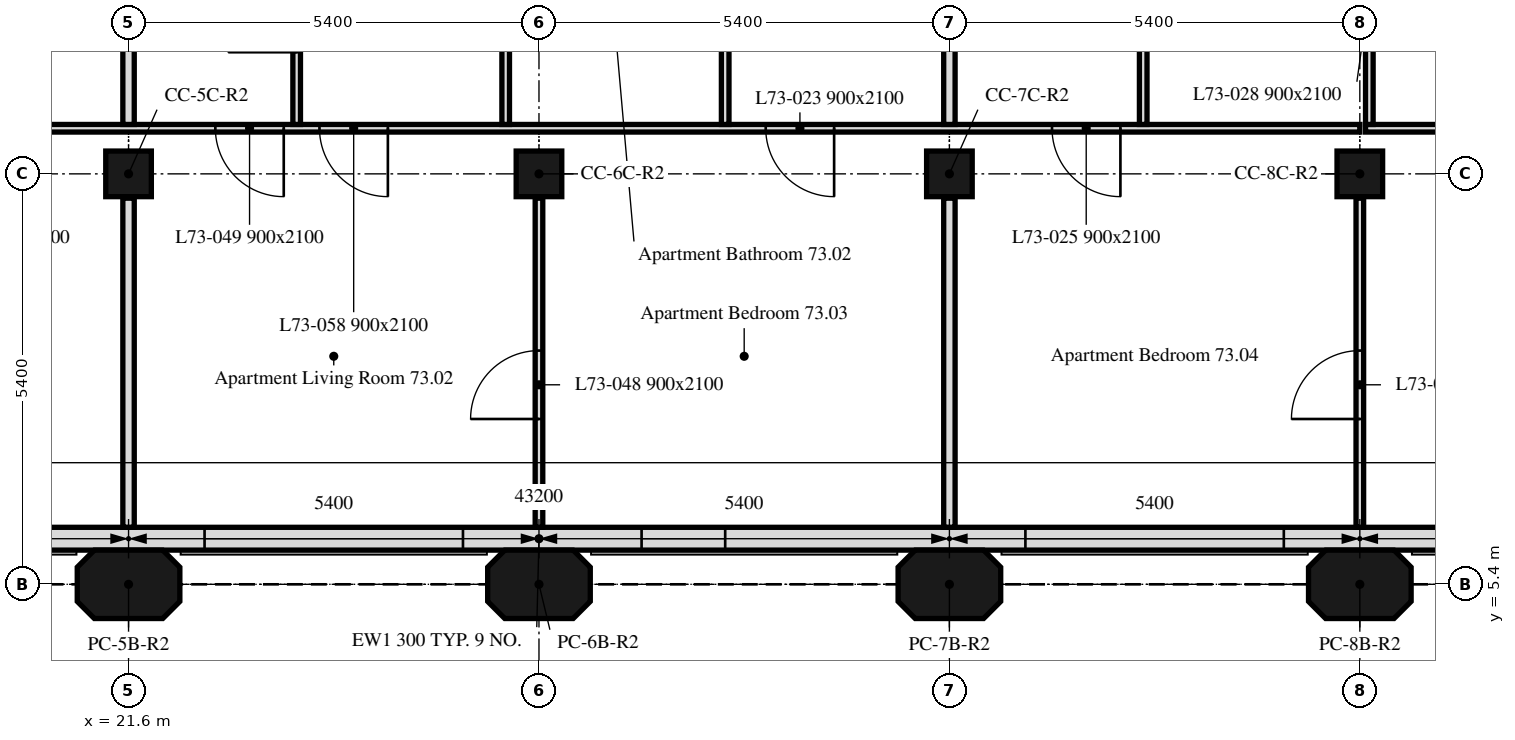
"""IFC4 building model, lengths in metres.
Left out: names, types, materials, properties, quantities, classifications, styles, units other than length and angle.
Written with IfcOpenShell. Run it as: python <this file> out.ifc"""

import sys

from ifc_helpers import new_model, si_unit, direction, frame, frame_2d, origin, origin_2d, place, context, subcontext, project, spatial, polyline, rectangle, outline, extrude, element, fill, save


model = new_model("IFC4")
c1 = context("Model", 3, precision=1e-05, world=origin(), true_north=direction((0.0, 1.0)))
c2 = subcontext(c1, "Body", "Model", "MODEL_VIEW")
j1 = project(units=[si_unit("LENGTHUNIT", "METRE"), si_unit("PLANEANGLEUNIT", "RADIAN")], contexts=[c1])
p1 = place(None, origin())
s1 = spatial("IfcSite", under=j1, at=p1, CompositionType="ELEMENT")
p2 = place(p1, origin())
s2 = spatial("IfcBuilding", under=s1, at=p2, CompositionType="ELEMENT")
p3 = place(p2, frame((0.0, 0.0, 295.0)))
s3 = spatial("IfcBuildingStorey", under=s2, at=p3, CompositionType="ELEMENT", Elevation=295.0)
for number, where, z_axis, x_axis in (
    (1, (21.6, 5.4, 0.0), (0.0, 0.0, 1.0), (1.0, 0.0, 0.0)),
    (2, (27.0, 5.4, 0.0), (0.0, 0.0, 1.0), (1.0, 0.0, 0.0)),
    (3, (32.4, 5.4, 0.0), (0.0, 0.0, 1.0), (1.0, 0.0, 0.0)),
    (4, (37.8, 5.4, 0.0), (0.0, 0.0, 1.0), (1.0, 0.0, 0.0)),
):
    element("IfcColumn", number, at=place(p3, frame(where, z_axis=z_axis, x_axis=x_axis)), inside=s3, PredefinedType="COLUMN", context=c2, shape_type="SweptSolid", body=[
        extrude(outline(polyline([(-0.45, -0.45), (0.45, -0.45), (0.675, -0.225), (0.675, 0.225), (0.45, 0.45), (-0.45, 0.45), (-0.675, 0.225), (-0.675, -0.225), (-0.45, -0.45)])), origin(), (0.0, 0.0, 1.0), 3.0),
    ])
for number, where, z_axis, x_axis in (
    (5, (21.6, 10.8, 0.0), (0.0, 0.0, 1.0), (1.0, 0.0, 0.0)),
    (6, (27.0, 10.8, 0.0), (0.0, 0.0, 1.0), (1.0, 0.0, 0.0)),
    (7, (32.4, 10.8, 0.0), (0.0, 0.0, 1.0), (1.0, 0.0, 0.0)),
    (8, (37.8, 10.8, 0.0), (0.0, 0.0, 1.0), (1.0, 0.0, 0.0)),
):
    element("IfcColumn", number, at=place(p3, frame(where, z_axis=z_axis, x_axis=x_axis)), inside=s3, PredefinedType="COLUMN", context=c2, shape_type="SweptSolid", body=[
        extrude(rectangle(XDim=0.6, YDim=0.6, at=origin_2d()), origin(), (0.0, 0.0, 1.0), 3.0),
    ])
p4 = place(p3, frame((10.986, 6.0, 0.0), z_axis=(0.0, 0.0, 1.0), x_axis=(1.0, 0.0, 0.0)))
e9 = element("IfcWall", 9, at=p4, inside=s3, PredefinedType="SOLIDWALL", context=c2, shape_type="SweptSolid", body=[
    extrude(rectangle(XDim=32.027, YDim=0.3, at=frame_2d((16.014, 0.0))), origin(), (0.0, 0.0, 1.0), 3.0),
])
p5 = place(p4, frame((0.814, 0.0, 0.9)))
e10 = element("IfcOpeningElement", 10, at=p5, cuts=e9, PredefinedType="OPENING", context=c2, shape_type="SweptSolid", body=[
    extrude(rectangle(XDim=3.4, YDim=1.7, at=frame_2d((1.7, 0.85))), frame((0.0, 0.16, 0.0), z_axis=(0.0, -1.0, 0.0), x_axis=(1.0, 0.0, 0.0)), (0.0, 0.0, 1.0), 0.32),
])
p6 = place(p4, frame((6.564, 0.0, 0.9)))
e11 = element("IfcOpeningElement", 11, at=p6, cuts=e9, PredefinedType="OPENING", context=c2, shape_type="SweptSolid", body=[
    extrude(rectangle(XDim=1.1, YDim=1.7, at=frame_2d((0.55, 0.85))), frame((0.0, 0.16, 0.0), z_axis=(0.0, -1.0, 0.0), x_axis=(1.0, 0.0, 0.0)), (0.0, 0.0, 1.0), 0.32),
])
p7 = place(p4, frame((11.614, 0.0, 0.9)))
e12 = element("IfcOpeningElement", 12, at=p7, cuts=e9, PredefinedType="OPENING", context=c2, shape_type="SweptSolid", body=[
    extrude(rectangle(XDim=3.4, YDim=1.7, at=frame_2d((1.7, 0.85))), frame((0.0, 0.16, 0.0), z_axis=(0.0, -1.0, 0.0), x_axis=(1.0, 0.0, 0.0)), (0.0, 0.0, 1.0), 0.32),
])
p8 = place(p4, frame((17.364, 0.0, 0.9)))
e13 = element("IfcOpeningElement", 13, at=p8, cuts=e9, PredefinedType="OPENING", context=c2, shape_type="SweptSolid", body=[
    extrude(rectangle(XDim=1.1, YDim=1.7, at=frame_2d((0.55, 0.85))), frame((0.0, 0.16, 0.0), z_axis=(0.0, -1.0, 0.0), x_axis=(1.0, 0.0, 0.0)), (0.0, 0.0, 1.0), 0.32),
])
p9 = place(p4, frame((22.414, 0.0, 0.9)))
e14 = element("IfcOpeningElement", 14, at=p9, cuts=e9, PredefinedType="OPENING", context=c2, shape_type="SweptSolid", body=[
    extrude(rectangle(XDim=3.4, YDim=1.7, at=frame_2d((1.7, 0.85))), frame((0.0, 0.16, 0.0), z_axis=(0.0, -1.0, 0.0), x_axis=(1.0, 0.0, 0.0)), (0.0, 0.0, 1.0), 0.32),
])
p10 = place(p4, frame((28.164, 0.0, 0.9)))
e15 = element("IfcOpeningElement", 15, at=p10, cuts=e9, PredefinedType="OPENING", context=c2, shape_type="SweptSolid", body=[
    extrude(rectangle(XDim=1.1, YDim=1.7, at=frame_2d((0.55, 0.85))), frame((0.0, 0.16, 0.0), z_axis=(0.0, -1.0, 0.0), x_axis=(1.0, 0.0, 0.0)), (0.0, 0.0, 1.0), 0.32),
])
p11 = place(p3, frame((21.6, 6.151, 0.0), z_axis=(0.0, 0.0, 1.0), x_axis=(0.0, 1.0, 0.0)))
e16 = element("IfcWall", 16, at=p11, inside=s3, PredefinedType="PARTITIONING", context=c2, shape_type="SweptSolid", body=[
    extrude(rectangle(XDim=4.329, YDim=0.15, at=frame_2d((2.165, 0.0))), origin(), (0.0, 0.0, 1.0), 3.0),
])
p12 = place(p3, frame((37.8, 11.4, 0.0), z_axis=(0.0, 0.0, 1.0), x_axis=(-1.0, 0.0, 0.0)))
e17 = element("IfcWall", 17, at=p12, inside=s3, PredefinedType="PARTITIONING", context=c2, shape_type="SweptSolid", body=[
    extrude(rectangle(XDim=21.6, YDim=0.1, at=frame_2d((10.8, 0.0))), origin(), (0.0, 0.0, 1.0), 3.0),
])
p13 = place(p12, frame((18.87, 0.0, 0.0)))
e18 = element("IfcOpeningElement", 18, at=p13, cuts=e17, PredefinedType="OPENING", context=c2, shape_type="SweptSolid", body=[
    extrude(rectangle(XDim=0.9, YDim=2.1, at=frame_2d((0.45, 1.05))), frame((0.0, 0.05, 0.0), z_axis=(0.0, -1.0, 0.0), x_axis=(1.0, 0.0, 0.0)), (0.0, 0.0, 1.0), 0.1),
])
p14 = place(p12, frame((17.5, 0.0, 0.0)))
e19 = element("IfcOpeningElement", 19, at=p14, cuts=e17, PredefinedType="OPENING", context=c2, shape_type="SweptSolid", body=[
    extrude(rectangle(XDim=0.9, YDim=2.1, at=frame_2d((0.45, 1.05))), frame((0.0, 0.05, 0.0), z_axis=(0.0, -1.0, 0.0), x_axis=(1.0, 0.0, 0.0)), (0.0, 0.0, 1.0), 0.1),
])
p15 = place(p12, frame((6.917, 0.0, 0.0)))
e20 = element("IfcOpeningElement", 20, at=p15, cuts=e17, PredefinedType="OPENING", context=c2, shape_type="SweptSolid", body=[
    extrude(rectangle(XDim=0.9, YDim=2.1, at=frame_2d((0.45, 1.05))), frame((0.0, 0.05, 0.0), z_axis=(0.0, -1.0, 0.0), x_axis=(1.0, 0.0, 0.0)), (0.0, 0.0, 1.0), 0.1),
])
p16 = place(p12, frame((3.15, 0.0, 0.0)))
e21 = element("IfcOpeningElement", 21, at=p16, cuts=e17, PredefinedType="OPENING", context=c2, shape_type="SweptSolid", body=[
    extrude(rectangle(XDim=0.9, YDim=2.1, at=frame_2d((0.45, 1.05))), frame((0.0, 0.05, 0.0), z_axis=(0.0, -1.0, 0.0), x_axis=(1.0, 0.0, 0.0)), (0.0, 0.0, 1.0), 0.1),
])
p17 = place(p12, frame((14.158, 0.0, 0.0)))
e22 = element("IfcOpeningElement", 22, at=p17, cuts=e17, PredefinedType="OPENING", context=c2, shape_type="SweptSolid", body=[
    extrude(rectangle(XDim=0.9, YDim=2.1, at=frame_2d((0.45, 1.05))), frame((0.0, 0.05, 0.0), z_axis=(0.0, -1.0, 0.0), x_axis=(1.0, 0.0, 0.0)), (0.0, 0.0, 1.0), 0.1),
])
p18 = place(p12, frame((12.788, 0.0, 0.0)))
e23 = element("IfcOpeningElement", 23, at=p18, cuts=e17, PredefinedType="OPENING", context=c2, shape_type="SweptSolid", body=[
    extrude(rectangle(XDim=0.9, YDim=2.1, at=frame_2d((0.45, 1.05))), frame((0.0, 0.05, 0.0), z_axis=(0.0, -1.0, 0.0), x_axis=(1.0, 0.0, 0.0)), (0.0, 0.0, 1.0), 0.1),
])
p19 = place(p3, frame((21.6, 11.45, 0.0), z_axis=(0.0, 0.0, 1.0), x_axis=(0.0, 1.0, 0.0)))
e24 = element("IfcWall", 24, at=p19, inside=s3, PredefinedType="PARTITIONING", context=c2, shape_type="SweptSolid", body=[
    extrude(rectangle(XDim=2.425, YDim=0.15, at=frame_2d((1.212, 0.0))), origin(), (0.0, 0.0, 1.0), 3.0),
])
p20 = place(p3, frame((27.0, 6.151, 0.0), z_axis=(0.0, 0.0, 1.0), x_axis=(0.0, 1.0, 0.0)))
e25 = element("IfcWall", 25, at=p20, inside=s3, PredefinedType="PARTITIONING", context=c2, shape_type="SweptSolid", body=[
    extrude(rectangle(XDim=4.329, YDim=0.1, at=frame_2d((2.165, 0.0))), origin(), (0.0, 0.0, 1.0), 3.0),
])
p21 = place(p20, frame((1.424, 0.0, 0.0)))
e26 = element("IfcOpeningElement", 26, at=p21, cuts=e25, PredefinedType="OPENING", context=c2, shape_type="SweptSolid", body=[
    extrude(rectangle(XDim=0.9, YDim=2.1, at=frame_2d((0.45, 1.05))), frame((0.0, 0.05, 0.0), z_axis=(0.0, -1.0, 0.0), x_axis=(1.0, 0.0, 0.0)), (0.0, 0.0, 1.0), 0.1),
])
p22 = place(p3, frame((32.4, 6.151, 0.0), z_axis=(0.0, 0.0, 1.0), x_axis=(0.0, 1.0, 0.0)))
e27 = element("IfcWall", 27, at=p22, inside=s3, PredefinedType="PARTITIONING", context=c2, shape_type="SweptSolid", body=[
    extrude(rectangle(XDim=4.329, YDim=0.15, at=frame_2d((2.165, 0.0))), origin(), (0.0, 0.0, 1.0), 3.0),
])
p23 = place(p3, frame((23.812, 11.45, 0.0), z_axis=(0.0, 0.0, 1.0), x_axis=(0.0, 1.0, 0.0)))
e28 = element("IfcWall", 28, at=p23, inside=s3, PredefinedType="PARTITIONING", context=c2, shape_type="SweptSolid", body=[
    extrude(rectangle(XDim=2.425, YDim=0.1, at=frame_2d((1.212, 0.0))), origin(), (0.0, 0.0, 1.0), 3.0),
])
p24 = place(p23, frame((0.95, 0.0, 0.0)))
e29 = element("IfcOpeningElement", 29, at=p24, cuts=e28, PredefinedType="OPENING", context=c2, shape_type="SweptSolid", body=[
    extrude(rectangle(XDim=0.9, YDim=2.1, at=frame_2d((0.45, 1.05))), frame((0.0, 0.05, 0.0), z_axis=(0.0, -1.0, 0.0), x_axis=(1.0, 0.0, 0.0)), (0.0, 0.0, 1.0), 0.1),
])
p25 = place(p3, frame((26.562, 11.45, 0.0), z_axis=(0.0, 0.0, 1.0), x_axis=(0.0, 1.0, 0.0)))
e30 = element("IfcWall", 30, at=p25, inside=s3, PredefinedType="PARTITIONING", context=c2, shape_type="SweptSolid", body=[
    extrude(rectangle(XDim=2.425, YDim=0.1, at=frame_2d((1.212, 0.0))), origin(), (0.0, 0.0, 1.0), 3.0),
])
p26 = place(p25, frame((1.275, 0.0, 0.0)))
e31 = element("IfcOpeningElement", 31, at=p26, cuts=e30, PredefinedType="OPENING", context=c2, shape_type="SweptSolid", body=[
    extrude(rectangle(XDim=0.9, YDim=2.1, at=frame_2d((0.45, 1.05))), frame((0.0, 0.05, 0.0), z_axis=(0.0, -1.0, 0.0), x_axis=(1.0, 0.0, 0.0)), (0.0, 0.0, 1.0), 0.1),
])
p27 = place(p3, frame((29.45, 11.45, 0.0), z_axis=(0.0, 0.0, 1.0), x_axis=(0.0, 1.0, 0.0)))
e32 = element("IfcWall", 32, at=p27, inside=s3, PredefinedType="PARTITIONING", context=c2, shape_type="SweptSolid", body=[
    extrude(rectangle(XDim=2.425, YDim=0.1, at=frame_2d((1.212, 0.0))), origin(), (0.0, 0.0, 1.0), 3.0),
])
p28 = place(p3, frame((32.4, 11.45, 0.0), z_axis=(0.0, 0.0, 1.0), x_axis=(0.0, 1.0, 0.0)))
e33 = element("IfcWall", 33, at=p28, inside=s3, PredefinedType="PARTITIONING", context=c2, shape_type="SweptSolid", body=[
    extrude(rectangle(XDim=2.425, YDim=0.15, at=frame_2d((1.212, 0.0))), origin(), (0.0, 0.0, 1.0), 3.0),
])
p29 = place(p3, frame((37.8, 6.151, 0.0), z_axis=(0.0, 0.0, 1.0), x_axis=(0.0, 1.0, 0.0)))
e34 = element("IfcWall", 34, at=p29, inside=s3, PredefinedType="PARTITIONING", context=c2, shape_type="SweptSolid", body=[
    extrude(rectangle(XDim=4.329, YDim=0.1, at=frame_2d((2.165, 0.0))), origin(), (0.0, 0.0, 1.0), 3.0),
])
p30 = place(p29, frame((1.424, 0.0, 0.0)))
e35 = element("IfcOpeningElement", 35, at=p30, cuts=e34, PredefinedType="OPENING", context=c2, shape_type="SweptSolid", body=[
    extrude(rectangle(XDim=0.9, YDim=2.1, at=frame_2d((0.45, 1.05))), frame((0.0, 0.05, 0.0), z_axis=(0.0, -1.0, 0.0), x_axis=(1.0, 0.0, 0.0)), (0.0, 0.0, 1.0), 0.1),
])
p31 = place(p3, frame((47.849, 11.4, 0.0), z_axis=(0.0, 0.0, 1.0), x_axis=(-1.0, 0.0, 0.0)))
e36 = element("IfcWall", 36, at=p31, inside=s3, PredefinedType="PARTITIONING", context=c2, shape_type="SweptSolid", body=[
    extrude(rectangle(XDim=9.974, YDim=0.1, at=frame_2d((4.987, 0.0))), origin(), (0.0, 0.0, 1.0), 3.0),
])
p32 = place(p31, frame((1.909, 0.0, 0.0)))
e37 = element("IfcOpeningElement", 37, at=p32, cuts=e36, PredefinedType="OPENING", context=c2, shape_type="SweptSolid", body=[
    extrude(rectangle(XDim=0.9, YDim=2.1, at=frame_2d((0.45, 1.05))), frame((0.0, 0.05, 0.0), z_axis=(0.0, -1.0, 0.0), x_axis=(1.0, 0.0, 0.0)), (0.0, 0.0, 1.0), 0.1),
])
p33 = place(p31, frame((0.25, 0.0, 0.0)))
e38 = element("IfcOpeningElement", 38, at=p33, cuts=e36, PredefinedType="OPENING", context=c2, shape_type="SweptSolid", body=[
    extrude(rectangle(XDim=0.9, YDim=2.1, at=frame_2d((0.45, 1.05))), frame((0.0, 0.05, 0.0), z_axis=(0.0, -1.0, 0.0), x_axis=(1.0, 0.0, 0.0)), (0.0, 0.0, 1.0), 0.1),
])
p34 = place(p31, frame((7.474, 0.0, 0.0)))
e39 = element("IfcOpeningElement", 39, at=p34, cuts=e36, PredefinedType="OPENING", context=c2, shape_type="SweptSolid", body=[
    extrude(rectangle(XDim=0.9, YDim=2.1, at=frame_2d((0.45, 1.05))), frame((0.0, 0.05, 0.0), z_axis=(0.0, -1.0, 0.0), x_axis=(1.0, 0.0, 0.0)), (0.0, 0.0, 1.0), 0.1),
])
p35 = place(p3, frame((34.95, 11.45, 0.0), z_axis=(0.0, 0.0, 1.0), x_axis=(0.0, 1.0, 0.0)))
e40 = element("IfcWall", 40, at=p35, inside=s3, PredefinedType="PARTITIONING", context=c2, shape_type="SweptSolid", body=[
    extrude(rectangle(XDim=2.425, YDim=0.1, at=frame_2d((1.212, 0.0))), origin(), (0.0, 0.0, 1.0), 3.0),
])
p36 = place(p3, frame((37.925, 11.45, 0.0), z_axis=(0.0, 0.0, 1.0), x_axis=(0.0, 1.0, 0.0)))
e41 = element("IfcWall", 41, at=p36, inside=s3, PredefinedType="PARTITIONING", context=c2, shape_type="SweptSolid", body=[
    extrude(rectangle(XDim=2.425, YDim=0.1, at=frame_2d((1.212, 0.0))), origin(), (0.0, 0.0, 1.0), 3.0),
])
p37 = place(p36, frame((1.275, 0.0, 0.0)))
e42 = element("IfcOpeningElement", 42, at=p37, cuts=e41, PredefinedType="OPENING", context=c2, shape_type="SweptSolid", body=[
    extrude(rectangle(XDim=0.9, YDim=2.1, at=frame_2d((0.45, 1.05))), frame((0.0, 0.05, 0.0), z_axis=(0.0, -1.0, 0.0), x_axis=(1.0, 0.0, 0.0)), (0.0, 0.0, 1.0), 0.1),
])
p38 = place(p7, origin())
e43 = element("IfcWindow", 43, at=p38, inside=s3, PartitioningType="SINGLE_PANEL", PredefinedType="WINDOW", context=c2, shape_type="SweptSolid", body=[
    extrude(rectangle(XDim=3.4, YDim=1.7, at=frame_2d((1.7, 0.85))), frame((0.0, 0.03, 0.0), z_axis=(0.0, -1.0, 0.0), x_axis=(1.0, 0.0, 0.0)), (0.0, 0.0, 1.0), 0.06),
])
fill(e12, e43)
p39 = place(p8, origin())
e44 = element("IfcWindow", 44, at=p39, inside=s3, PartitioningType="SINGLE_PANEL", PredefinedType="WINDOW", context=c2, shape_type="SweptSolid", body=[
    extrude(rectangle(XDim=1.1, YDim=1.7, at=frame_2d((0.55, 0.85))), frame((0.0, 0.03, 0.0), z_axis=(0.0, -1.0, 0.0), x_axis=(1.0, 0.0, 0.0)), (0.0, 0.0, 1.0), 0.06),
])
fill(e13, e44)
p40 = place(p9, origin())
e45 = element("IfcWindow", 45, at=p40, inside=s3, PartitioningType="SINGLE_PANEL", PredefinedType="WINDOW", context=c2, shape_type="SweptSolid", body=[
    extrude(rectangle(XDim=3.4, YDim=1.7, at=frame_2d((1.7, 0.85))), frame((0.0, 0.03, 0.0), z_axis=(0.0, -1.0, 0.0), x_axis=(1.0, 0.0, 0.0)), (0.0, 0.0, 1.0), 0.06),
])
fill(e14, e45)
p41 = place(p15, origin())
e46 = element("IfcDoor", 46, at=p41, inside=s3, OperationType="SINGLE_SWING_LEFT", PredefinedType="DOOR", context=c2, shape_type="SweptSolid", body=[
    extrude(rectangle(XDim=0.9, YDim=2.1, at=frame_2d((0.45, 1.05))), frame((0.0, 0.025, 0.0), z_axis=(0.0, -1.0, 0.0), x_axis=(1.0, 0.0, 0.0)), (0.0, 0.0, 1.0), 0.05),
])
fill(e20, e46)
p42 = place(p16, origin())
e47 = element("IfcDoor", 47, at=p42, inside=s3, OperationType="SINGLE_SWING_RIGHT", PredefinedType="DOOR", context=c2, shape_type="SweptSolid", body=[
    extrude(rectangle(XDim=0.9, YDim=2.1, at=frame_2d((0.45, 1.05))), frame((0.0, 0.025, 0.0), z_axis=(0.0, -1.0, 0.0), x_axis=(1.0, 0.0, 0.0)), (0.0, 0.0, 1.0), 0.05),
])
fill(e21, e47)
p43 = place(p21, origin())
e48 = element("IfcDoor", 48, at=p43, inside=s3, OperationType="SINGLE_SWING_RIGHT", PredefinedType="DOOR", context=c2, shape_type="SweptSolid", body=[
    extrude(rectangle(XDim=0.9, YDim=2.1, at=frame_2d((0.45, 1.05))), frame((0.0, 0.025, 0.0), z_axis=(0.0, -1.0, 0.0), x_axis=(1.0, 0.0, 0.0)), (0.0, 0.0, 1.0), 0.05),
])
fill(e26, e48)
p44 = place(p17, origin())
e49 = element("IfcDoor", 49, at=p44, inside=s3, OperationType="SINGLE_SWING_RIGHT", PredefinedType="DOOR", context=c2, shape_type="SweptSolid", body=[
    extrude(rectangle(XDim=0.9, YDim=2.1, at=frame_2d((0.45, 1.05))), frame((0.0, 0.025, 0.0), z_axis=(0.0, -1.0, 0.0), x_axis=(1.0, 0.0, 0.0)), (0.0, 0.0, 1.0), 0.05),
])
fill(e22, e49)
p45 = place(p30, origin())
e50 = element("IfcDoor", 50, at=p45, inside=s3, OperationType="SINGLE_SWING_LEFT", PredefinedType="DOOR", context=c2, shape_type="SweptSolid", body=[
    extrude(rectangle(XDim=0.9, YDim=2.1, at=frame_2d((0.45, 1.05))), frame((0.0, 0.025, 0.0), z_axis=(0.0, -1.0, 0.0), x_axis=(1.0, 0.0, 0.0)), (0.0, 0.0, 1.0), 0.05),
])
fill(e35, e50)
p46 = place(p18, origin())
e51 = element("IfcDoor", 51, at=p46, inside=s3, OperationType="SINGLE_SWING_LEFT", PredefinedType="DOOR", context=c2, shape_type="SweptSolid", body=[
    extrude(rectangle(XDim=0.9, YDim=2.1, at=frame_2d((0.45, 1.05))), frame((0.0, 0.025, 0.0), z_axis=(0.0, -1.0, 0.0), x_axis=(1.0, 0.0, 0.0)), (0.0, 0.0, 1.0), 0.05),
])
fill(e23, e51)
save(model, sys.argv[1])
